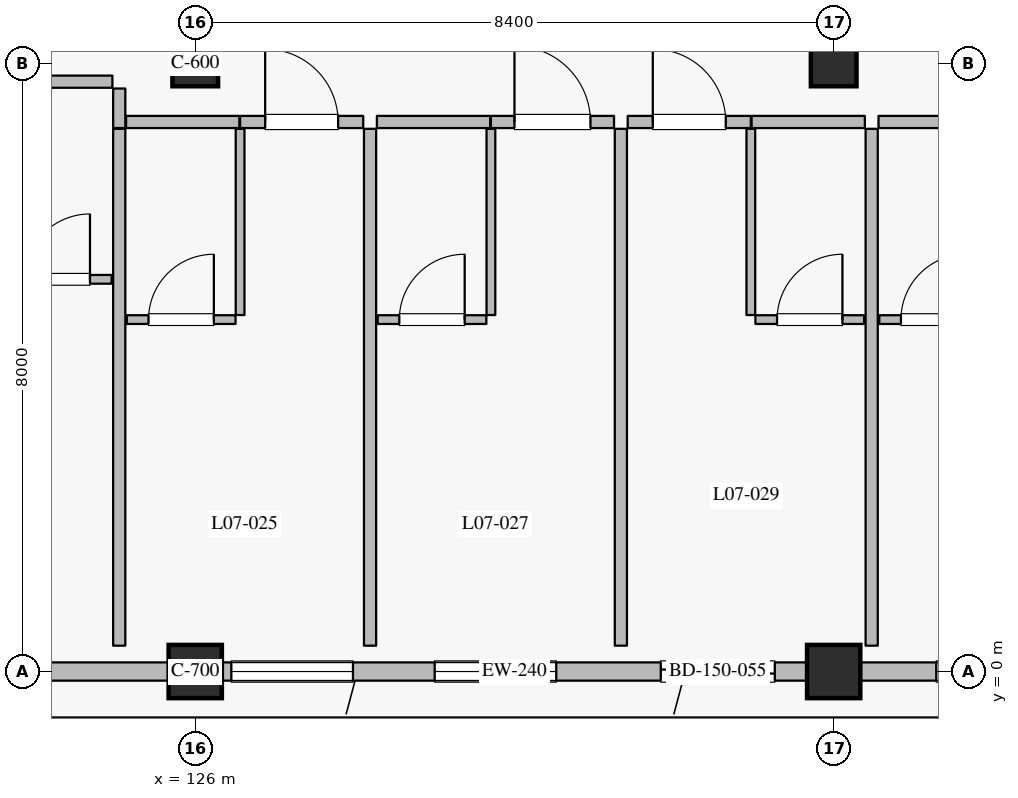
"""IFC4 building model, lengths in metres.
Left out: names, types, materials, properties, quantities, classifications, styles, units other than length and angle.
Written with IfcOpenShell. Run it as: python <this file> out.ifc"""

import sys

from ifc_helpers import new_model, si_unit, direction, frame, frame_2d, origin, origin_2d, place, context, subcontext, project, spatial, rectangle, extrude, element, fill, save


model = new_model("IFC4")
c1 = context("Model", 3, precision=1e-05, world=origin(), true_north=direction((0.0, 1.0)))
c2 = subcontext(c1, "Body", "Model", "MODEL_VIEW")
j1 = project(units=[si_unit("LENGTHUNIT", "METRE"), si_unit("PLANEANGLEUNIT", "RADIAN")], contexts=[c1])
p1 = place(None, origin())
s1 = spatial("IfcSite", under=j1, at=p1, CompositionType="ELEMENT")
p2 = place(p1, origin())
s2 = spatial("IfcBuilding", under=s1, at=p2, CompositionType="ELEMENT")
p3 = place(p2, frame((0.0, 0.0, 32.4)))
s3 = spatial("IfcBuildingStorey", under=s2, at=p3, CompositionType="ELEMENT", Elevation=32.4)
for number, where, z_axis, x_axis in (
    (1, (126.0, 0.0, 0.0), (0.0, 0.0, 1.0), (1.0, 0.0, 0.0)),
    (2, (134.4, 0.0, 0.0), (0.0, 0.0, 1.0), (1.0, 0.0, 0.0)),
):
    element("IfcColumn", number, at=place(p3, frame(where, z_axis=z_axis, x_axis=x_axis)), inside=s3, PredefinedType="COLUMN", context=c2, shape_type="SweptSolid", body=[
        extrude(rectangle(XDim=0.7, YDim=0.7, at=origin_2d()), origin(), (0.0, 0.0, 1.0), 3.6),
    ])
for number, where, z_axis, x_axis in (
    (3, (126.0, 8.0, 0.0), (0.0, 0.0, 1.0), (1.0, 0.0, 0.0)),
    (4, (134.4, 8.0, 0.0), (0.0, 0.0, 1.0), (1.0, 0.0, 0.0)),
):
    element("IfcColumn", number, at=place(p3, frame(where, z_axis=z_axis, x_axis=x_axis)), inside=s3, PredefinedType="COLUMN", context=c2, shape_type="SweptSolid", body=[
        extrude(rectangle(XDim=0.6, YDim=0.6, at=origin_2d()), origin(), (0.0, 0.0, 1.0), 3.6),
    ])
p4 = place(p3, frame((125.65, 0.0, 0.0), z_axis=(0.0, 0.0, 1.0), x_axis=(-1.0, 0.0, 0.0)))
e5 = element("IfcWall", 5, at=p4, inside=s3, PredefinedType="SOLIDWALL", context=c2, shape_type="SweptSolid", body=[
    extrude(rectangle(XDim=7.7, YDim=0.24, at=frame_2d((3.85, 0.0))), origin(), (0.0, 0.0, 1.0), 2.94),
])
p5 = place(p4, frame((1.55, 0.0, 0.0)))
e6 = element("IfcOpeningElement", 6, at=p5, cuts=e5, PredefinedType="OPENING", context=c2, shape_type="SweptSolid", body=[
    extrude(rectangle(XDim=1.5, YDim=2.25, at=frame_2d((0.75, 1.125))), frame((0.0, 0.13, 0.0), z_axis=(0.0, -1.0, 0.0), x_axis=(1.0, 0.0, 0.0)), (0.0, 0.0, 1.0), 0.26),
])
p6 = place(p4, frame((4.8, 0.0, 0.8)))
e7 = element("IfcOpeningElement", 7, at=p6, cuts=e5, PredefinedType="OPENING", context=c2, shape_type="SweptSolid", body=[
    extrude(rectangle(XDim=1.6, YDim=1.6, at=frame_2d((0.8, 0.8))), frame((0.0, 0.13, 0.0), z_axis=(0.0, -1.0, 0.0), x_axis=(1.0, 0.0, 0.0)), (0.0, 0.0, 1.0), 0.26),
])
p7 = place(p3, frame((134.05, 0.0, 0.0), z_axis=(0.0, 0.0, 1.0), x_axis=(-1.0, 0.0, 0.0)))
e8 = element("IfcWall", 8, at=p7, inside=s3, PredefinedType="SOLIDWALL", context=c2, shape_type="SweptSolid", body=[
    extrude(rectangle(XDim=7.7, YDim=0.24, at=frame_2d((3.85, 0.0))), origin(), (0.0, 0.0, 1.0), 2.94),
])
p8 = place(p7, frame((0.425, 0.0, 0.0)))
e9 = element("IfcOpeningElement", 9, at=p8, cuts=e8, PredefinedType="OPENING", context=c2, shape_type="SweptSolid", body=[
    extrude(rectangle(XDim=1.5, YDim=2.25, at=frame_2d((0.75, 1.125))), frame((0.0, 0.13, 0.0), z_axis=(0.0, -1.0, 0.0), x_axis=(1.0, 0.0, 0.0)), (0.0, 0.0, 1.0), 0.26),
])
p9 = place(p7, frame((3.3, 0.0, 0.8)))
e10 = element("IfcOpeningElement", 10, at=p9, cuts=e8, PredefinedType="OPENING", context=c2, shape_type="SweptSolid", body=[
    extrude(rectangle(XDim=1.6, YDim=1.6, at=frame_2d((0.8, 0.8))), frame((0.0, 0.13, 0.0), z_axis=(0.0, -1.0, 0.0), x_axis=(1.0, 0.0, 0.0)), (0.0, 0.0, 1.0), 0.26),
])
p10 = place(p7, frame((5.975, 0.0, 0.8)))
e11 = element("IfcOpeningElement", 11, at=p10, cuts=e8, PredefinedType="OPENING", context=c2, shape_type="SweptSolid", body=[
    extrude(rectangle(XDim=1.6, YDim=1.6, at=frame_2d((0.8, 0.8))), frame((0.0, 0.13, 0.0), z_axis=(0.0, -1.0, 0.0), x_axis=(1.0, 0.0, 0.0)), (0.0, 0.0, 1.0), 0.26),
])
p11 = place(p3, frame((142.45, 0.0, 0.0), z_axis=(0.0, 0.0, 1.0), x_axis=(-1.0, 0.0, 0.0)))
e12 = element("IfcWall", 12, at=p11, inside=s3, PredefinedType="SOLIDWALL", context=c2, shape_type="SweptSolid", body=[
    extrude(rectangle(XDim=7.7, YDim=0.24, at=frame_2d((3.85, 0.0))), origin(), (0.0, 0.0, 1.0), 2.94),
])
p12 = place(p11, frame((1.85, 0.0, 0.0)))
e13 = element("IfcOpeningElement", 13, at=p12, cuts=e12, PredefinedType="OPENING", context=c2, shape_type="SweptSolid", body=[
    extrude(rectangle(XDim=1.5, YDim=2.25, at=frame_2d((0.75, 1.125))), frame((0.0, 0.13, 0.0), z_axis=(0.0, -1.0, 0.0), x_axis=(1.0, 0.0, 0.0)), (0.0, 0.0, 1.0), 0.26),
])
p13 = place(p11, frame((5.1, 0.0, 0.8)))
e14 = element("IfcOpeningElement", 14, at=p13, cuts=e12, PredefinedType="OPENING", context=c2, shape_type="SweptSolid", body=[
    extrude(rectangle(XDim=1.6, YDim=1.6, at=frame_2d((0.8, 0.8))), frame((0.0, 0.13, 0.0), z_axis=(0.0, -1.0, 0.0), x_axis=(1.0, 0.0, 0.0)), (0.0, 0.0, 1.0), 0.26),
])
p14 = place(p3, frame((123.42, 7.76, 0.0), z_axis=(0.0, 0.0, 1.0), x_axis=(1.0, 0.0, 0.0)))
e15 = element("IfcWall", 15, at=p14, inside=s3, PredefinedType="PARTITIONING", context=c2, shape_type="SweptSolid", body=[
    extrude(rectangle(XDim=1.49, YDim=0.16, at=frame_2d((0.745, 0.0))), origin(), (0.0, 0.0, 1.0), 3.335),
])
p15 = place(p3, frame((123.47, 5.16, 0.0), z_axis=(0.0, 0.0, 1.0), x_axis=(1.0, 0.0, 0.0)))
e16 = element("IfcWall", 16, at=p15, inside=s3, PredefinedType="PARTITIONING", context=c2, shape_type="SweptSolid", body=[
    extrude(rectangle(XDim=1.43, YDim=0.115, at=frame_2d((0.715, 0.0))), origin(), (0.0, 0.0, 1.0), 3.335),
])
p16 = place(p15, frame((0.285, 0.0, 0.0)))
e17 = element("IfcOpeningElement", 17, at=p16, cuts=e16, PredefinedType="OPENING", context=c2, shape_type="SweptSolid", body=[
    extrude(rectangle(XDim=0.86, YDim=2.12, at=frame_2d((0.43, 1.06))), frame((0.0, 0.067, 0.0), z_axis=(0.0, -1.0, 0.0), x_axis=(1.0, 0.0, 0.0)), (0.0, 0.0, 1.0), 0.135),
])
p17 = place(p3, frame((125.0, 7.15, 0.0), z_axis=(0.0, 0.0, 1.0), x_axis=(0.0, 1.0, 0.0)))
e18 = element("IfcWall", 18, at=p17, inside=s3, PredefinedType="PARTITIONING", context=c2, shape_type="SweptSolid", body=[
    extrude(rectangle(XDim=0.52, YDim=0.16, at=frame_2d((0.26, 0.0))), origin(), (0.0, 0.0, 1.0), 3.335),
])
p18 = place(p3, frame((125.09, 7.23, 0.0), z_axis=(0.0, 0.0, 1.0), x_axis=(1.0, 0.0, 0.0)))
e19 = element("IfcWall", 19, at=p18, inside=s3, PredefinedType="PARTITIONING", context=c2, shape_type="SweptSolid", body=[
    extrude(rectangle(XDim=1.49, YDim=0.16, at=frame_2d((0.745, 0.0))), origin(), (0.0, 0.0, 1.0), 3.335),
])
p19 = place(p3, frame((126.59, 7.23, 0.0), z_axis=(0.0, 0.0, 1.0), x_axis=(1.0, 0.0, 0.0)))
e20 = element("IfcWall", 20, at=p19, inside=s3, PredefinedType="PARTITIONING", context=c2, shape_type="SweptSolid", body=[
    extrude(rectangle(XDim=1.62, YDim=0.16, at=frame_2d((0.81, 0.0))), origin(), (0.0, 0.0, 1.0), 3.335),
])
p20 = place(p19, frame((0.33, 0.0, 0.0)))
e21 = element("IfcOpeningElement", 21, at=p20, cuts=e20, PredefinedType="OPENING", context=c2, shape_type="SweptSolid", body=[
    extrude(rectangle(XDim=0.96, YDim=2.2, at=frame_2d((0.48, 1.1))), frame((0.0, 0.09, 0.0), z_axis=(0.0, -1.0, 0.0), x_axis=(1.0, 0.0, 0.0)), (0.0, 0.0, 1.0), 0.18),
])
p21 = place(p3, frame((126.59, 4.69, 0.0), z_axis=(0.0, 0.0, 1.0), x_axis=(0.0, 1.0, 0.0)))
e22 = element("IfcWall", 22, at=p21, inside=s3, PredefinedType="PARTITIONING", context=c2, shape_type="SweptSolid", body=[
    extrude(rectangle(XDim=2.45, YDim=0.115, at=frame_2d((1.225, 0.0))), origin(), (0.0, 0.0, 1.0), 3.335),
])
p22 = place(p3, frame((125.1, 4.63, 0.0), z_axis=(0.0, 0.0, 1.0), x_axis=(1.0, 0.0, 0.0)))
e23 = element("IfcWall", 23, at=p22, inside=s3, PredefinedType="PARTITIONING", context=c2, shape_type="SweptSolid", body=[
    extrude(rectangle(XDim=1.43, YDim=0.115, at=frame_2d((0.715, 0.0))), origin(), (0.0, 0.0, 1.0), 3.335),
])
p23 = place(p22, frame((0.285, 0.0, 0.0)))
e24 = element("IfcOpeningElement", 24, at=p23, cuts=e23, PredefinedType="OPENING", context=c2, shape_type="SweptSolid", body=[
    extrude(rectangle(XDim=0.86, YDim=2.12, at=frame_2d((0.43, 1.06))), frame((0.0, 0.067, 0.0), z_axis=(0.0, -1.0, 0.0), x_axis=(1.0, 0.0, 0.0)), (0.0, 0.0, 1.0), 0.135),
])
p24 = place(p3, frame((125.0, 0.34, 0.0), z_axis=(0.0, 0.0, 1.0), x_axis=(0.0, 1.0, 0.0)))
e25 = element("IfcWall", 25, at=p24, inside=s3, PredefinedType="PARTITIONING", context=c2, shape_type="SweptSolid", body=[
    extrude(rectangle(XDim=6.8, YDim=0.16, at=frame_2d((3.4, 0.0))), origin(), (0.0, 0.0, 1.0), 3.335),
])
p25 = place(p3, frame((128.39, 7.23, 0.0), z_axis=(0.0, 0.0, 1.0), x_axis=(1.0, 0.0, 0.0)))
e26 = element("IfcWall", 26, at=p25, inside=s3, PredefinedType="PARTITIONING", context=c2, shape_type="SweptSolid", body=[
    extrude(rectangle(XDim=1.49, YDim=0.16, at=frame_2d((0.745, 0.0))), origin(), (0.0, 0.0, 1.0), 3.335),
])
p26 = place(p3, frame((129.89, 7.23, 0.0), z_axis=(0.0, 0.0, 1.0), x_axis=(1.0, 0.0, 0.0)))
e27 = element("IfcWall", 27, at=p26, inside=s3, PredefinedType="PARTITIONING", context=c2, shape_type="SweptSolid", body=[
    extrude(rectangle(XDim=1.62, YDim=0.16, at=frame_2d((0.81, 0.0))), origin(), (0.0, 0.0, 1.0), 3.335),
])
p27 = place(p26, frame((0.31, 0.0, 0.0)))
e28 = element("IfcOpeningElement", 28, at=p27, cuts=e27, PredefinedType="OPENING", context=c2, shape_type="SweptSolid", body=[
    extrude(rectangle(XDim=1.0, YDim=2.25, at=frame_2d((0.5, 1.125))), frame((0.0, 0.09, 0.0), z_axis=(0.0, -1.0, 0.0), x_axis=(1.0, 0.0, 0.0)), (0.0, 0.0, 1.0), 0.18),
])
p28 = place(p3, frame((129.89, 4.69, 0.0), z_axis=(0.0, 0.0, 1.0), x_axis=(0.0, 1.0, 0.0)))
e29 = element("IfcWall", 29, at=p28, inside=s3, PredefinedType="PARTITIONING", context=c2, shape_type="SweptSolid", body=[
    extrude(rectangle(XDim=2.45, YDim=0.115, at=frame_2d((1.225, 0.0))), origin(), (0.0, 0.0, 1.0), 3.335),
])
p29 = place(p3, frame((128.4, 4.63, 0.0), z_axis=(0.0, 0.0, 1.0), x_axis=(1.0, 0.0, 0.0)))
e30 = element("IfcWall", 30, at=p29, inside=s3, PredefinedType="PARTITIONING", context=c2, shape_type="SweptSolid", body=[
    extrude(rectangle(XDim=1.43, YDim=0.115, at=frame_2d((0.715, 0.0))), origin(), (0.0, 0.0, 1.0), 3.335),
])
p30 = place(p29, frame((0.285, 0.0, 0.0)))
e31 = element("IfcOpeningElement", 31, at=p30, cuts=e30, PredefinedType="OPENING", context=c2, shape_type="SweptSolid", body=[
    extrude(rectangle(XDim=0.86, YDim=2.12, at=frame_2d((0.43, 1.06))), frame((0.0, 0.067, 0.0), z_axis=(0.0, -1.0, 0.0), x_axis=(1.0, 0.0, 0.0)), (0.0, 0.0, 1.0), 0.135),
])
p31 = place(p3, frame((128.3, 0.34, 0.0), z_axis=(0.0, 0.0, 1.0), x_axis=(0.0, 1.0, 0.0)))
e32 = element("IfcWall", 32, at=p31, inside=s3, PredefinedType="PARTITIONING", context=c2, shape_type="SweptSolid", body=[
    extrude(rectangle(XDim=6.8, YDim=0.16, at=frame_2d((3.4, 0.0))), origin(), (0.0, 0.0, 1.0), 3.335),
])
p32 = place(p3, frame((131.69, 7.23, 0.0), z_axis=(0.0, 0.0, 1.0), x_axis=(1.0, 0.0, 0.0)))
e33 = element("IfcWall", 33, at=p32, inside=s3, PredefinedType="PARTITIONING", context=c2, shape_type="SweptSolid", body=[
    extrude(rectangle(XDim=1.62, YDim=0.16, at=frame_2d((0.81, 0.0))), origin(), (0.0, 0.0, 1.0), 3.335),
])
p33 = place(p32, frame((0.33, 0.0, 0.0)))
e34 = element("IfcOpeningElement", 34, at=p33, cuts=e33, PredefinedType="OPENING", context=c2, shape_type="SweptSolid", body=[
    extrude(rectangle(XDim=0.96, YDim=2.2, at=frame_2d((0.48, 1.1))), frame((0.0, 0.09, 0.0), z_axis=(0.0, -1.0, 0.0), x_axis=(1.0, 0.0, 0.0)), (0.0, 0.0, 1.0), 0.18),
])
p34 = place(p3, frame((133.32, 7.23, 0.0), z_axis=(0.0, 0.0, 1.0), x_axis=(1.0, 0.0, 0.0)))
e35 = element("IfcWall", 35, at=p34, inside=s3, PredefinedType="PARTITIONING", context=c2, shape_type="SweptSolid", body=[
    extrude(rectangle(XDim=1.49, YDim=0.16, at=frame_2d((0.745, 0.0))), origin(), (0.0, 0.0, 1.0), 3.335),
])
p35 = place(p3, frame((133.31, 4.69, 0.0), z_axis=(0.0, 0.0, 1.0), x_axis=(0.0, 1.0, 0.0)))
e36 = element("IfcWall", 36, at=p35, inside=s3, PredefinedType="PARTITIONING", context=c2, shape_type="SweptSolid", body=[
    extrude(rectangle(XDim=2.45, YDim=0.115, at=frame_2d((1.225, 0.0))), origin(), (0.0, 0.0, 1.0), 3.335),
])
p36 = place(p3, frame((133.37, 4.63, 0.0), z_axis=(0.0, 0.0, 1.0), x_axis=(1.0, 0.0, 0.0)))
e37 = element("IfcWall", 37, at=p36, inside=s3, PredefinedType="PARTITIONING", context=c2, shape_type="SweptSolid", body=[
    extrude(rectangle(XDim=1.43, YDim=0.115, at=frame_2d((0.715, 0.0))), origin(), (0.0, 0.0, 1.0), 3.335),
])
p37 = place(p36, frame((0.285, 0.0, 0.0)))
e38 = element("IfcOpeningElement", 38, at=p37, cuts=e37, PredefinedType="OPENING", context=c2, shape_type="SweptSolid", body=[
    extrude(rectangle(XDim=0.86, YDim=2.12, at=frame_2d((0.43, 1.06))), frame((0.0, 0.067, 0.0), z_axis=(0.0, -1.0, 0.0), x_axis=(1.0, 0.0, 0.0)), (0.0, 0.0, 1.0), 0.135),
])
p38 = place(p3, frame((131.6, 0.34, 0.0), z_axis=(0.0, 0.0, 1.0), x_axis=(0.0, 1.0, 0.0)))
e39 = element("IfcWall", 39, at=p38, inside=s3, PredefinedType="PARTITIONING", context=c2, shape_type="SweptSolid", body=[
    extrude(rectangle(XDim=6.8, YDim=0.16, at=frame_2d((3.4, 0.0))), origin(), (0.0, 0.0, 1.0), 3.335),
])
p39 = place(p3, frame((134.99, 7.23, 0.0), z_axis=(0.0, 0.0, 1.0), x_axis=(1.0, 0.0, 0.0)))
e40 = element("IfcWall", 40, at=p39, inside=s3, PredefinedType="PARTITIONING", context=c2, shape_type="SweptSolid", body=[
    extrude(rectangle(XDim=1.49, YDim=0.16, at=frame_2d((0.745, 0.0))), origin(), (0.0, 0.0, 1.0), 3.335),
])
p40 = place(p3, frame((135.0, 4.63, 0.0), z_axis=(0.0, 0.0, 1.0), x_axis=(1.0, 0.0, 0.0)))
e41 = element("IfcWall", 41, at=p40, inside=s3, PredefinedType="PARTITIONING", context=c2, shape_type="SweptSolid", body=[
    extrude(rectangle(XDim=1.43, YDim=0.115, at=frame_2d((0.715, 0.0))), origin(), (0.0, 0.0, 1.0), 3.335),
])
p41 = place(p40, frame((0.285, 0.0, 0.0)))
e42 = element("IfcOpeningElement", 42, at=p41, cuts=e41, PredefinedType="OPENING", context=c2, shape_type="SweptSolid", body=[
    extrude(rectangle(XDim=0.86, YDim=2.12, at=frame_2d((0.43, 1.06))), frame((0.0, 0.067, 0.0), z_axis=(0.0, -1.0, 0.0), x_axis=(1.0, 0.0, 0.0)), (0.0, 0.0, 1.0), 0.135),
])
p42 = place(p3, frame((134.9, 0.34, 0.0), z_axis=(0.0, 0.0, 1.0), x_axis=(0.0, 1.0, 0.0)))
e43 = element("IfcWall", 43, at=p42, inside=s3, PredefinedType="PARTITIONING", context=c2, shape_type="SweptSolid", body=[
    extrude(rectangle(XDim=6.8, YDim=0.16, at=frame_2d((3.4, 0.0))), origin(), (0.0, 0.0, 1.0), 3.335),
])
p43 = place(p8, origin())
e44 = element("IfcDoor", 44, at=p43, inside=s3, OperationType="SLIDING_TO_LEFT", PredefinedType="DOOR", context=c2, shape_type="SweptSolid", body=[
    extrude(rectangle(XDim=1.5, YDim=2.25, at=frame_2d((0.75, 1.125))), frame((0.0, 0.025, 0.0), z_axis=(0.0, -1.0, 0.0), x_axis=(1.0, 0.0, 0.0)), (0.0, 0.0, 1.0), 0.05),
])
fill(e9, e44)
p44 = place(p9, origin())
e45 = element("IfcWindow", 45, at=p44, inside=s3, PartitioningType="SINGLE_PANEL", PredefinedType="WINDOW", context=c2, shape_type="SweptSolid", body=[
    extrude(rectangle(XDim=1.6, YDim=1.6, at=frame_2d((0.8, 0.8))), frame((0.0, 0.03, 0.0), z_axis=(0.0, -1.0, 0.0), x_axis=(1.0, 0.0, 0.0)), (0.0, 0.0, 1.0), 0.06),
])
fill(e10, e45)
p45 = place(p10, origin())
e46 = element("IfcWindow", 46, at=p45, inside=s3, PartitioningType="SINGLE_PANEL", PredefinedType="WINDOW", context=c2, shape_type="SweptSolid", body=[
    extrude(rectangle(XDim=1.6, YDim=1.6, at=frame_2d((0.8, 0.8))), frame((0.0, 0.03, 0.0), z_axis=(0.0, -1.0, 0.0), x_axis=(1.0, 0.0, 0.0)), (0.0, 0.0, 1.0), 0.06),
])
fill(e11, e46)
p46 = place(p13, origin())
e47 = element("IfcWindow", 47, at=p46, inside=s3, PartitioningType="SINGLE_PANEL", PredefinedType="WINDOW", context=c2, shape_type="SweptSolid", body=[
    extrude(rectangle(XDim=1.6, YDim=1.6, at=frame_2d((0.8, 0.8))), frame((0.0, 0.03, 0.0), z_axis=(0.0, -1.0, 0.0), x_axis=(1.0, 0.0, 0.0)), (0.0, 0.0, 1.0), 0.06),
])
fill(e14, e47)
p47 = place(p16, origin())
e48 = element("IfcDoor", 48, at=p47, inside=s3, OperationType="SINGLE_SWING_RIGHT", PredefinedType="DOOR", context=c2, shape_type="SweptSolid", body=[
    extrude(rectangle(XDim=0.86, YDim=2.12, at=frame_2d((0.43, 1.06))), frame((0.0, 0.025, 0.0), z_axis=(0.0, -1.0, 0.0), x_axis=(1.0, 0.0, 0.0)), (0.0, 0.0, 1.0), 0.05),
])
fill(e17, e48)
p48 = place(p20, origin())
e49 = element("IfcDoor", 49, at=p48, inside=s3, OperationType="SINGLE_SWING_LEFT", PredefinedType="DOOR", context=c2, shape_type="SweptSolid", body=[
    extrude(rectangle(XDim=0.96, YDim=2.2, at=frame_2d((0.48, 1.1))), frame((0.0, 0.025, 0.0), z_axis=(0.0, -1.0, 0.0), x_axis=(1.0, 0.0, 0.0)), (0.0, 0.0, 1.0), 0.05),
])
fill(e21, e49)
p49 = place(p23, origin())
e50 = element("IfcDoor", 50, at=p49, inside=s3, OperationType="SINGLE_SWING_RIGHT", PredefinedType="DOOR", context=c2, shape_type="SweptSolid", body=[
    extrude(rectangle(XDim=0.86, YDim=2.12, at=frame_2d((0.43, 1.06))), frame((0.0, 0.025, 0.0), z_axis=(0.0, -1.0, 0.0), x_axis=(1.0, 0.0, 0.0)), (0.0, 0.0, 1.0), 0.05),
])
fill(e24, e50)
p50 = place(p27, origin())
e51 = element("IfcDoor", 51, at=p50, inside=s3, OperationType="SINGLE_SWING_LEFT", PredefinedType="DOOR", context=c2, shape_type="SweptSolid", body=[
    extrude(rectangle(XDim=1.0, YDim=2.25, at=frame_2d((0.5, 1.125))), frame((0.0, 0.025, 0.0), z_axis=(0.0, -1.0, 0.0), x_axis=(1.0, 0.0, 0.0)), (0.0, 0.0, 1.0), 0.05),
])
fill(e28, e51)
p51 = place(p30, origin())
e52 = element("IfcDoor", 52, at=p51, inside=s3, OperationType="SINGLE_SWING_RIGHT", PredefinedType="DOOR", context=c2, shape_type="SweptSolid", body=[
    extrude(rectangle(XDim=0.86, YDim=2.12, at=frame_2d((0.43, 1.06))), frame((0.0, 0.025, 0.0), z_axis=(0.0, -1.0, 0.0), x_axis=(1.0, 0.0, 0.0)), (0.0, 0.0, 1.0), 0.05),
])
fill(e31, e52)
p52 = place(p33, origin())
e53 = element("IfcDoor", 53, at=p52, inside=s3, OperationType="SINGLE_SWING_LEFT", PredefinedType="DOOR", context=c2, shape_type="SweptSolid", body=[
    extrude(rectangle(XDim=0.96, YDim=2.2, at=frame_2d((0.48, 1.1))), frame((0.0, 0.025, 0.0), z_axis=(0.0, -1.0, 0.0), x_axis=(1.0, 0.0, 0.0)), (0.0, 0.0, 1.0), 0.05),
])
fill(e34, e53)
p53 = place(p37, origin())
e54 = element("IfcDoor", 54, at=p53, inside=s3, OperationType="SINGLE_SWING_RIGHT", PredefinedType="DOOR", context=c2, shape_type="SweptSolid", body=[
    extrude(rectangle(XDim=0.86, YDim=2.12, at=frame_2d((0.43, 1.06))), frame((0.0, 0.025, 0.0), z_axis=(0.0, -1.0, 0.0), x_axis=(1.0, 0.0, 0.0)), (0.0, 0.0, 1.0), 0.05),
])
fill(e38, e54)
p54 = place(p41, origin())
e55 = element("IfcDoor", 55, at=p54, inside=s3, OperationType="SINGLE_SWING_RIGHT", PredefinedType="DOOR", context=c2, shape_type="SweptSolid", body=[
    extrude(rectangle(XDim=0.86, YDim=2.12, at=frame_2d((0.43, 1.06))), frame((0.0, 0.025, 0.0), z_axis=(0.0, -1.0, 0.0), x_axis=(1.0, 0.0, 0.0)), (0.0, 0.0, 1.0), 0.05),
])
fill(e42, e55)
save(model, sys.argv[1])
